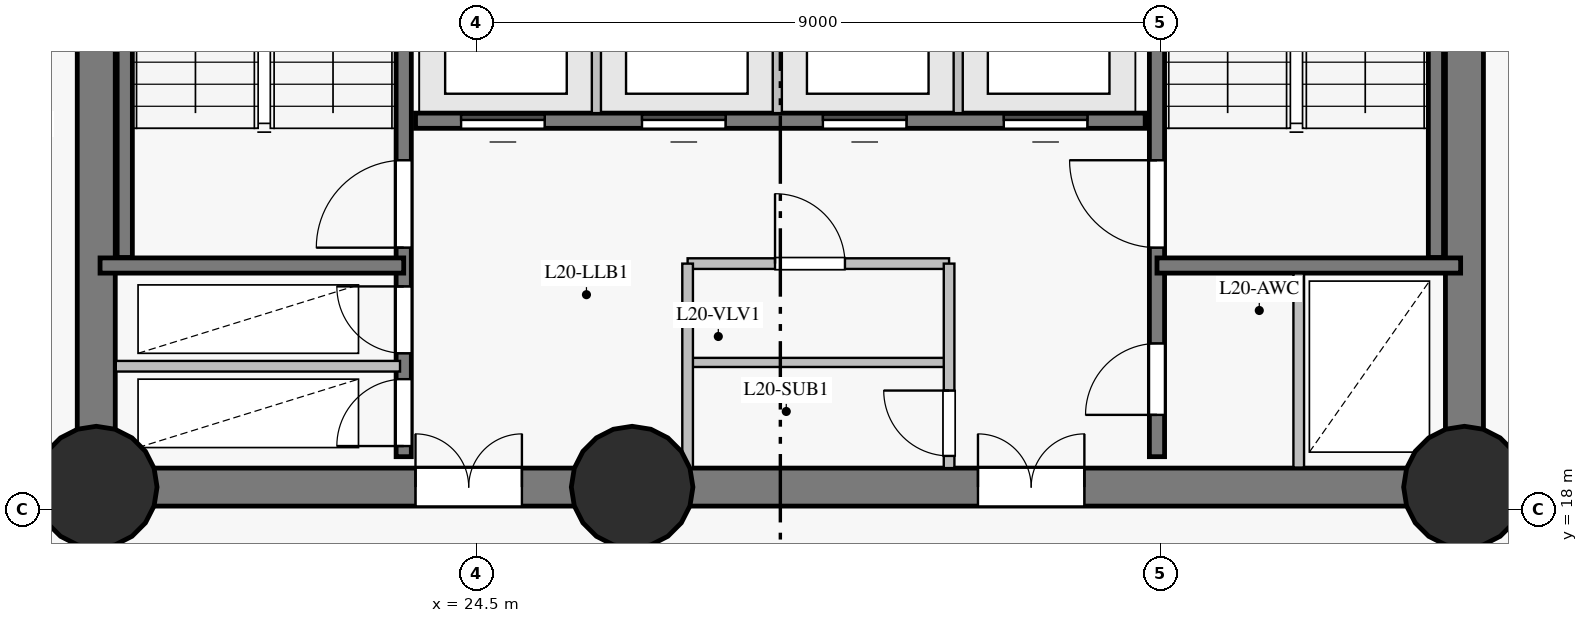
"""IFC4 building model, lengths in metres.
Left out: names, types, materials, properties, quantities, classifications, styles, units other than length and angle.
Written with IfcOpenShell. Run it as: python <this file> out.ifc"""

import sys

from ifc_helpers import new_model, si_unit, direction, frame, frame_2d, origin, origin_with_axes, origin_2d, place, context, subcontext, project, spatial, rectangle, circle, extrude, source, transform, mapped, element, fill, save


model = new_model("IFC4")
c1 = context("Model", 3, precision=1e-05, world=origin(), true_north=direction((0.0, 1.0)))
c2 = subcontext(c1, "Body", "Model", "MODEL_VIEW")
j1 = project(units=[si_unit("LENGTHUNIT", "METRE"), si_unit("PLANEANGLEUNIT", "RADIAN")], contexts=[c1])
p1 = place(None, origin())
s1 = spatial("IfcSite", under=j1, at=p1, CompositionType="ELEMENT")
p2 = place(p1, origin())
s2 = spatial("IfcBuilding", under=s1, at=p2, CompositionType="ELEMENT")
p3 = place(p2, frame((0.0, 0.0, 76.9)))
s3 = spatial("IfcBuildingStorey", under=s2, at=p3, CompositionType="ELEMENT", Elevation=76.9)
p4 = place(p3, frame((19.5, 18.3, 0.0), z_axis=(0.0, 0.0, 1.0), x_axis=(1.0, 0.0, 0.0)))
e1 = element("IfcWall", 1, at=p4, inside=s3, PredefinedType="SHEAR", context=c2, shape_type="SweptSolid", body=[
    extrude(rectangle(XDim=7.05, YDim=0.5, at=frame_2d((3.525, 0.0))), origin(), (0.0, 0.0, 1.0), 3.35),
])
p5 = place(p4, frame((4.2, 0.0, 0.0)))
e2 = element("IfcOpeningElement", 2, at=p5, cuts=e1, PredefinedType="OPENING", context=c2, shape_type="SweptSolid", body=[
    extrude(rectangle(XDim=1.4, YDim=2.2, at=frame_2d((0.7, 1.1))), frame((0.0, 0.26, 0.0), z_axis=(0.0, -1.0, 0.0), x_axis=(1.0, 0.0, 0.0)), (0.0, 0.0, 1.0), 0.52),
])
p6 = place(p3, frame((26.55, 18.3, 0.0), z_axis=(0.0, 0.0, 1.0), x_axis=(1.0, 0.0, 0.0)))
e3 = element("IfcWall", 3, at=p6, inside=s3, PredefinedType="SHEAR", context=c2, shape_type="SweptSolid", body=[
    extrude(rectangle(XDim=10.95, YDim=0.5, at=frame_2d((5.475, 0.0))), origin(), (0.0, 0.0, 1.0), 3.35),
])
p7 = place(p6, frame((4.55, 0.0, 0.0)))
e4 = element("IfcOpeningElement", 4, at=p7, cuts=e3, PredefinedType="OPENING", context=c2, shape_type="SweptSolid", body=[
    extrude(rectangle(XDim=1.4, YDim=2.2, at=frame_2d((0.7, 1.1))), frame((0.0, 0.26, 0.0), z_axis=(0.0, -1.0, 0.0), x_axis=(1.0, 0.0, 0.0)), (0.0, 0.0, 1.0), 0.52),
])
p8 = place(p3, frame((37.5, 18.3, 0.0), z_axis=(0.0, 0.0, 1.0), x_axis=(0.0, 1.0, 0.0)))
e5 = element("IfcWall", 5, at=p8, inside=s3, PredefinedType="SHEAR", context=c2, shape_type="SweptSolid", body=[
    extrude(rectangle(XDim=16.4, YDim=0.5, at=frame_2d((8.2, 0.0))), origin(), (0.0, 0.0, 1.0), 3.35),
])
p9 = place(p8, frame((14.06, 0.0, 0.0)))
e6 = element("IfcOpeningElement", 6, at=p9, cuts=e5, PredefinedType="OPENING", context=c2, shape_type="SweptSolid", body=[
    extrude(rectangle(XDim=1.2, YDim=2.15, at=frame_2d((0.6, 1.075))), frame((0.0, 0.26, 0.0), z_axis=(0.0, -1.0, 0.0), x_axis=(1.0, 0.0, 0.0)), (0.0, 0.0, 1.0), 0.52),
])
p10 = place(p3, frame((19.5, 34.7, 0.0), z_axis=(0.0, 0.0, 1.0), x_axis=(0.0, -1.0, 0.0)))
e7 = element("IfcWall", 7, at=p10, inside=s3, PredefinedType="SHEAR", context=c2, shape_type="SweptSolid", body=[
    extrude(rectangle(XDim=16.4, YDim=0.5, at=frame_2d((8.2, 0.0))), origin(), (0.0, 0.0, 1.0), 3.35),
])
p11 = place(p10, frame((3.1, 0.0, 0.0)))
e8 = element("IfcOpeningElement", 8, at=p11, cuts=e7, PredefinedType="OPENING", context=c2, shape_type="SweptSolid", body=[
    extrude(rectangle(XDim=1.1, YDim=2.15, at=frame_2d((0.55, 1.075))), frame((0.0, 0.26, 0.0), z_axis=(0.0, -1.0, 0.0), x_axis=(1.0, 0.0, 0.0)), (0.0, 0.0, 1.0), 0.52),
])
m1 = source(origin_with_axes(), c2, "Body", "SweptSolid", [
    extrude(circle(Radius=0.8, at=origin_2d()), origin(), (0.0, 0.0, 1.0), 3.6),
])
for number, where, z_axis, x_axis in (
    (9, (19.5, 18.3, 0.0), (0.0, 0.0, 1.0), (1.0, 0.0, 0.0)),
    (10, (26.55, 18.3, 0.0), (0.0, 0.0, 1.0), (1.0, 0.0, 0.0)),
    (11, (37.5, 18.3, 0.0), (0.0, 0.0, 1.0), (1.0, 0.0, 0.0)),
):
    element("IfcColumn", number, at=place(p3, frame(where, z_axis=z_axis, x_axis=x_axis)), inside=s3, PredefinedType="COLUMN", context=c2, shape_type="MappedRepresentation", body=[
        mapped(m1, transform((0.0, 0.0, 0.0), scale=1.0)),
    ])
p12 = place(p3, frame((37.825, 10.417, 0.0), z_axis=(0.0, 0.0, 1.0), x_axis=(0.688609262867, 0.725132596905, 0.0)))
e12 = element("IfcWall", 12, at=p12, inside=s3, PredefinedType="SOLIDWALL", context=c2, shape_type="SweptSolid", body=[
    extrude(rectangle(XDim=10.481, YDim=0.32, at=frame_2d((5.241, 0.0))), origin(), (0.0, 0.0, 1.0), 3.35),
])
p13 = place(p12, frame((1.552, 0.0, 0.85)))
e13 = element("IfcOpeningElement", 13, at=p13, cuts=e12, PredefinedType="OPENING", context=c2, shape_type="SweptSolid", body=[
    extrude(rectangle(XDim=2.1, YDim=1.95, at=frame_2d((1.05, 0.975))), frame((0.0, 0.17, 0.0), z_axis=(0.0, -1.0, 0.0), x_axis=(1.0, 0.0, 0.0)), (0.0, 0.0, 1.0), 0.34),
])
p14 = place(p12, frame((7.513, 0.0, 0.85)))
e14 = element("IfcOpeningElement", 14, at=p14, cuts=e12, PredefinedType="OPENING", context=c2, shape_type="SweptSolid", body=[
    extrude(rectangle(XDim=2.1, YDim=1.95, at=frame_2d((1.05, 0.975))), frame((0.0, 0.17, 0.0), z_axis=(0.0, -1.0, 0.0), x_axis=(1.0, 0.0, 0.0)), (0.0, 0.0, 1.0), 0.34),
])
p15 = place(p3, frame((23.545, 18.7, 0.0), z_axis=(0.0, 0.0, 1.0), x_axis=(0.0, 1.0, 0.0)))
e15 = element("IfcWall", 15, at=p15, inside=s3, PredefinedType="SHEAR", context=c2, shape_type="SweptSolid", body=[
    extrude(rectangle(XDim=15.6, YDim=0.2, at=frame_2d((7.8, 0.0))), origin(), (0.0, 0.0, 1.0), 3.35),
])
p16 = place(p15, frame((2.75, 0.0, 0.0)))
e16 = element("IfcOpeningElement", 16, at=p16, cuts=e15, PredefinedType="OPENING", context=c2, shape_type="SweptSolid", body=[
    extrude(rectangle(XDim=1.15, YDim=2.15, at=frame_2d((0.575, 1.075))), frame((0.0, 0.11, 0.0), z_axis=(0.0, -1.0, 0.0), x_axis=(1.0, 0.0, 0.0)), (0.0, 0.0, 1.0), 0.22),
])
p17 = place(p15, frame((0.14, 0.0, 0.0)))
e17 = element("IfcOpeningElement", 17, at=p17, cuts=e15, PredefinedType="OPENING", context=c2, shape_type="SweptSolid", body=[
    extrude(rectangle(XDim=0.88, YDim=2.1, at=frame_2d((0.44, 1.05))), frame((0.0, 0.11, 0.0), z_axis=(0.0, -1.0, 0.0), x_axis=(1.0, 0.0, 0.0)), (0.0, 0.0, 1.0), 0.22),
])
p18 = place(p15, frame((1.36, 0.0, 0.0)))
e18 = element("IfcOpeningElement", 18, at=p18, cuts=e15, PredefinedType="OPENING", context=c2, shape_type="SweptSolid", body=[
    extrude(rectangle(XDim=0.88, YDim=2.1, at=frame_2d((0.44, 1.05))), frame((0.0, 0.11, 0.0), z_axis=(0.0, -1.0, 0.0), x_axis=(1.0, 0.0, 0.0)), (0.0, 0.0, 1.0), 0.22),
])
p19 = place(p15, frame((12.1, 0.0, 0.0)))
e19 = element("IfcOpeningElement", 19, at=p19, cuts=e15, PredefinedType="OPENING", context=c2, shape_type="SweptSolid", body=[
    extrude(rectangle(XDim=1.12, YDim=2.15, at=frame_2d((0.56, 1.075))), frame((0.0, 0.11, 0.0), z_axis=(0.0, -1.0, 0.0), x_axis=(1.0, 0.0, 0.0)), (0.0, 0.0, 1.0), 0.22),
])
p20 = place(p15, frame((14.05, 0.0, 0.0)))
e20 = element("IfcOpeningElement", 20, at=p20, cuts=e15, PredefinedType="OPENING", context=c2, shape_type="SweptSolid", body=[
    extrude(rectangle(XDim=1.12, YDim=2.15, at=frame_2d((0.56, 1.075))), frame((0.0, 0.11, 0.0), z_axis=(0.0, -1.0, 0.0), x_axis=(1.0, 0.0, 0.0)), (0.0, 0.0, 1.0), 0.22),
])
p21 = place(p3, frame((33.455, 18.7, 0.0), z_axis=(0.0, 0.0, 1.0), x_axis=(0.0, 1.0, 0.0)))
e21 = element("IfcWall", 21, at=p21, inside=s3, PredefinedType="SHEAR", context=c2, shape_type="SweptSolid", body=[
    extrude(rectangle(XDim=15.6, YDim=0.2, at=frame_2d((7.8, 0.0))), origin(), (0.0, 0.0, 1.0), 3.35),
])
p22 = place(p21, frame((2.75, 0.0, 0.0)))
e22 = element("IfcOpeningElement", 22, at=p22, cuts=e21, PredefinedType="OPENING", context=c2, shape_type="SweptSolid", body=[
    extrude(rectangle(XDim=1.15, YDim=2.15, at=frame_2d((0.575, 1.075))), frame((0.0, 0.11, 0.0), z_axis=(0.0, -1.0, 0.0), x_axis=(1.0, 0.0, 0.0)), (0.0, 0.0, 1.0), 0.22),
])
p23 = place(p21, frame((0.55, 0.0, 0.0)))
e23 = element("IfcOpeningElement", 23, at=p23, cuts=e21, PredefinedType="OPENING", context=c2, shape_type="SweptSolid", body=[
    extrude(rectangle(XDim=0.94, YDim=2.1, at=frame_2d((0.47, 1.05))), frame((0.0, 0.11, 0.0), z_axis=(0.0, -1.0, 0.0), x_axis=(1.0, 0.0, 0.0)), (0.0, 0.0, 1.0), 0.22),
])
p24 = place(p3, frame((23.7, 23.12, 0.0), z_axis=(0.0, 0.0, 1.0), x_axis=(1.0, 0.0, 0.0)))
e24 = element("IfcWall", 24, at=p24, inside=s3, PredefinedType="SHEAR", context=c2, shape_type="SweptSolid", body=[
    extrude(rectangle(XDim=9.6, YDim=0.2, at=frame_2d((4.8, 0.0))), origin(), (0.0, 0.0, 1.0), 3.35),
])
p25 = place(p24, frame((0.6, 0.0, 0.0)))
e25 = element("IfcOpeningElement", 25, at=p25, cuts=e24, PredefinedType="OPENING", context=c2, shape_type="SweptSolid", body=[
    extrude(rectangle(XDim=1.1, YDim=2.15, at=frame_2d((0.55, 1.075))), frame((0.0, 0.11, 0.0), z_axis=(0.0, -1.0, 0.0), x_axis=(1.0, 0.0, 0.0)), (0.0, 0.0, 1.0), 0.22),
])
p26 = place(p24, frame((2.98, 0.0, 0.0)))
e26 = element("IfcOpeningElement", 26, at=p26, cuts=e24, PredefinedType="OPENING", context=c2, shape_type="SweptSolid", body=[
    extrude(rectangle(XDim=1.1, YDim=2.15, at=frame_2d((0.55, 1.075))), frame((0.0, 0.11, 0.0), z_axis=(0.0, -1.0, 0.0), x_axis=(1.0, 0.0, 0.0)), (0.0, 0.0, 1.0), 0.22),
])
p27 = place(p24, frame((5.36, 0.0, 0.0)))
e27 = element("IfcOpeningElement", 27, at=p27, cuts=e24, PredefinedType="OPENING", context=c2, shape_type="SweptSolid", body=[
    extrude(rectangle(XDim=1.1, YDim=2.15, at=frame_2d((0.55, 1.075))), frame((0.0, 0.11, 0.0), z_axis=(0.0, -1.0, 0.0), x_axis=(1.0, 0.0, 0.0)), (0.0, 0.0, 1.0), 0.22),
])
p28 = place(p24, frame((7.74, 0.0, 0.0)))
e28 = element("IfcOpeningElement", 28, at=p28, cuts=e24, PredefinedType="OPENING", context=c2, shape_type="SweptSolid", body=[
    extrude(rectangle(XDim=1.1, YDim=2.15, at=frame_2d((0.55, 1.075))), frame((0.0, 0.11, 0.0), z_axis=(0.0, -1.0, 0.0), x_axis=(1.0, 0.0, 0.0)), (0.0, 0.0, 1.0), 0.22),
])
for number, where, z_axis, x_axis in (
    (29, (19.875, 21.32, 0.0), (0.0, 0.0, 1.0), (0.0, 1.0, 0.0)),
    (30, (37.125, 21.32, 0.0), (0.0, 0.0, 1.0), (0.0, 1.0, 0.0)),
):
    element("IfcWall", number, at=place(p3, frame(where, z_axis=z_axis, x_axis=x_axis)), inside=s3, PredefinedType="SHEAR", context=c2, shape_type="SweptSolid", body=[
        extrude(rectangle(XDim=7.5, YDim=0.2, at=frame_2d((3.75, 0.0))), origin(), (0.0, 0.0, 1.0), 3.35),
    ])
for number, where, z_axis, x_axis in (
    (31, (33.455, 21.215, 0.0), (0.0, 0.0, 1.0), (1.0, 0.0, 0.0)),
    (32, (19.55, 21.215, 0.0), (0.0, 0.0, 1.0), (1.0, 0.0, 0.0)),
):
    element("IfcWall", number, at=place(p3, frame(where, z_axis=z_axis, x_axis=x_axis)), inside=s3, PredefinedType="SHEAR", context=c2, shape_type="SweptSolid", body=[
        extrude(rectangle(XDim=3.995, YDim=0.2, at=frame_2d((1.998, 0.0))), origin(), (0.0, 0.0, 1.0), 3.35),
    ])
p29 = place(p3, frame((19.757, 19.89, 0.0), z_axis=(0.0, 0.0, 1.0), x_axis=(1.0, 0.0, 0.0)))
e33 = element("IfcWall", 33, at=p29, inside=s3, PredefinedType="PARTITIONING", context=c2, shape_type="SweptSolid", body=[
    extrude(rectangle(XDim=3.739, YDim=0.14, at=frame_2d((1.87, 0.0))), origin(), (0.0, 0.0, 1.0), 3.35),
])
p30 = place(p3, frame((27.28, 21.24, 0.0), z_axis=(0.0, 0.0, 1.0), x_axis=(1.0, 0.0, 0.0)))
e34 = element("IfcWall", 34, at=p30, inside=s3, PredefinedType="PARTITIONING", context=c2, shape_type="SweptSolid", body=[
    extrude(rectangle(XDim=3.44, YDim=0.14, at=frame_2d((1.72, 0.0))), origin(), (0.0, 0.0, 1.0), 3.35),
])
p31 = place(p30, frame((1.15, 0.0, 0.0)))
e35 = element("IfcOpeningElement", 35, at=p31, cuts=e34, PredefinedType="OPENING", context=c2, shape_type="SweptSolid", body=[
    extrude(rectangle(XDim=0.92, YDim=2.1, at=frame_2d((0.46, 1.05))), frame((0.0, 0.08, 0.0), z_axis=(0.0, -1.0, 0.0), x_axis=(1.0, 0.0, 0.0)), (0.0, 0.0, 1.0), 0.16),
])
p32 = place(p3, frame((27.28, 19.94, 0.0), z_axis=(0.0, 0.0, 1.0), x_axis=(1.0, 0.0, 0.0)))
e36 = element("IfcWall", 36, at=p32, inside=s3, PredefinedType="PARTITIONING", context=c2, shape_type="SweptSolid", body=[
    extrude(rectangle(XDim=3.44, YDim=0.12, at=frame_2d((1.72, 0.0))), origin(), (0.0, 0.0, 1.0), 3.35),
])
p33 = place(p3, frame((27.28, 18.55, 0.0), z_axis=(0.0, 0.0, 1.0), x_axis=(0.0, 1.0, 0.0)))
e37 = element("IfcWall", 37, at=p33, inside=s3, PredefinedType="PARTITIONING", context=c2, shape_type="SweptSolid", body=[
    extrude(rectangle(XDim=2.69, YDim=0.14, at=frame_2d((1.345, 0.0))), origin(), (0.0, 0.0, 1.0), 3.35),
])
p34 = place(p3, frame((30.72, 18.55, 0.0), z_axis=(0.0, 0.0, 1.0), x_axis=(0.0, 1.0, 0.0)))
e38 = element("IfcWall", 38, at=p34, inside=s3, PredefinedType="PARTITIONING", context=c2, shape_type="SweptSolid", body=[
    extrude(rectangle(XDim=2.69, YDim=0.14, at=frame_2d((1.345, 0.0))), origin(), (0.0, 0.0, 1.0), 3.35),
])
p35 = place(p34, frame((0.16, 0.0, 0.0)))
e39 = element("IfcOpeningElement", 39, at=p35, cuts=e38, PredefinedType="OPENING", context=c2, shape_type="SweptSolid", body=[
    extrude(rectangle(XDim=0.86, YDim=2.1, at=frame_2d((0.43, 1.05))), frame((0.0, 0.08, 0.0), z_axis=(0.0, -1.0, 0.0), x_axis=(1.0, 0.0, 0.0)), (0.0, 0.0, 1.0), 0.16),
])
for number, where, z_axis, x_axis in (
    (40, (26.08, 23.22, 0.0), (0.0, 0.0, 1.0), (0.0, 1.0, 0.0)),
    (41, (28.46, 23.22, 0.0), (0.0, 0.0, 1.0), (0.0, 1.0, 0.0)),
    (42, (30.84, 23.22, 0.0), (0.0, 0.0, 1.0), (0.0, 1.0, 0.0)),
):
    element("IfcWall", number, at=place(p3, frame(where, z_axis=z_axis, x_axis=x_axis)), inside=s3, PredefinedType="PARTITIONING", context=c2, shape_type="SweptSolid", body=[
        extrude(rectangle(XDim=2.6, YDim=0.12, at=frame_2d((1.3, 0.0))), origin(), (0.0, 0.0, 1.0), 3.35),
    ])
p36 = place(p3, frame((35.32, 18.557, 0.0), z_axis=(0.0, 0.0, 1.0), x_axis=(0.0, 1.0, 0.0)))
e43 = element("IfcWall", 43, at=p36, inside=s3, PredefinedType="PARTITIONING", context=c2, shape_type="SweptSolid", body=[
    extrude(rectangle(XDim=2.553, YDim=0.14, at=frame_2d((1.277, 0.0))), origin(), (0.0, 0.0, 1.0), 3.35),
])
m2 = source(origin_with_axes(), c2, "Body", "SweptSolid", [
    extrude(rectangle(XDim=1.15, YDim=2.15, at=frame_2d((0.575, 1.075))), frame((0.0, 0.025, 0.0), z_axis=(0.0, -1.0, 0.0), x_axis=(1.0, 0.0, 0.0)), (0.0, 0.0, 1.0), 0.05),
])
p37 = place(p16, origin())
e44 = element("IfcDoor", 44, at=p37, inside=s3, OperationType="SINGLE_SWING_LEFT", PredefinedType="DOOR", context=c2, shape_type="MappedRepresentation", body=[
    mapped(m2, transform((0.0, 0.0, 0.0), scale=1.0)),
])
fill(e16, e44)
p38 = place(p22, origin())
e45 = element("IfcDoor", 45, at=p38, inside=s3, OperationType="SINGLE_SWING_RIGHT", PredefinedType="DOOR", context=c2, shape_type="MappedRepresentation", body=[
    mapped(m2, transform((0.0, 0.0, 0.0), scale=1.0)),
])
fill(e22, e45)
m3 = source(origin_with_axes(), c2, "Body", "SweptSolid", [
    extrude(rectangle(XDim=0.88, YDim=2.1, at=frame_2d((0.44, 1.05))), frame((0.0, 0.025, 0.0), z_axis=(0.0, -1.0, 0.0), x_axis=(1.0, 0.0, 0.0)), (0.0, 0.0, 1.0), 0.05),
])
p39 = place(p17, origin())
e46 = element("IfcDoor", 46, at=p39, inside=s3, OperationType="SINGLE_SWING_LEFT", PredefinedType="DOOR", context=c2, shape_type="MappedRepresentation", body=[
    mapped(m3, transform((0.0, 0.0, 0.0), scale=1.0)),
])
fill(e17, e46)
p40 = place(p18, origin())
e47 = element("IfcDoor", 47, at=p40, inside=s3, OperationType="SINGLE_SWING_RIGHT", PredefinedType="DOOR", context=c2, shape_type="MappedRepresentation", body=[
    mapped(m3, transform((0.0, 0.0, 0.0), scale=1.0)),
])
fill(e18, e47)
m4 = source(origin_with_axes(), c2, "Body", "SweptSolid", [
    extrude(rectangle(XDim=1.4, YDim=2.2, at=frame_2d((0.7, 1.1))), frame((0.0, 0.025, 0.0), z_axis=(0.0, -1.0, 0.0), x_axis=(1.0, 0.0, 0.0)), (0.0, 0.0, 1.0), 0.05),
])
p41 = place(p5, origin())
e48 = element("IfcDoor", 48, at=p41, inside=s3, OperationType="DOUBLE_DOOR_SINGLE_SWING", PredefinedType="DOOR", context=c2, shape_type="MappedRepresentation", body=[
    mapped(m4, transform((0.0, 0.0, 0.0), scale=1.0)),
])
fill(e2, e48)
p42 = place(p7, origin())
e49 = element("IfcDoor", 49, at=p42, inside=s3, OperationType="DOUBLE_DOOR_SINGLE_SWING", PredefinedType="DOOR", context=c2, shape_type="MappedRepresentation", body=[
    mapped(m4, transform((0.0, 0.0, 0.0), scale=1.0)),
])
fill(e4, e49)
m5 = source(origin_with_axes(), c2, "Body", "SweptSolid", [
    extrude(rectangle(XDim=0.94, YDim=2.1, at=frame_2d((0.47, 1.05))), frame((0.0, 0.025, 0.0), z_axis=(0.0, -1.0, 0.0), x_axis=(1.0, 0.0, 0.0)), (0.0, 0.0, 1.0), 0.05),
])
p43 = place(p23, origin())
e50 = element("IfcDoor", 50, at=p43, inside=s3, OperationType="SINGLE_SWING_LEFT", PredefinedType="DOOR", context=c2, shape_type="MappedRepresentation", body=[
    mapped(m5, transform((0.0, 0.0, 0.0), scale=1.0)),
])
fill(e23, e50)
m6 = source(origin_with_axes(), c2, "Body", "SweptSolid", [
    extrude(rectangle(XDim=0.86, YDim=2.1, at=frame_2d((0.43, 1.05))), frame((0.0, 0.025, 0.0), z_axis=(0.0, -1.0, 0.0), x_axis=(1.0, 0.0, 0.0)), (0.0, 0.0, 1.0), 0.05),
])
p44 = place(p35, origin())
e51 = element("IfcDoor", 51, at=p44, inside=s3, OperationType="SINGLE_SWING_RIGHT", PredefinedType="DOOR", context=c2, shape_type="MappedRepresentation", body=[
    mapped(m6, transform((0.0, 0.0, 0.0), scale=1.0)),
])
fill(e39, e51)
m7 = source(origin_with_axes(), c2, "Body", "SweptSolid", [
    extrude(rectangle(XDim=0.92, YDim=2.1, at=frame_2d((0.46, 1.05))), frame((0.0, 0.025, 0.0), z_axis=(0.0, -1.0, 0.0), x_axis=(1.0, 0.0, 0.0)), (0.0, 0.0, 1.0), 0.05),
])
p45 = place(p31, origin())
e52 = element("IfcDoor", 52, at=p45, inside=s3, OperationType="SINGLE_SWING_LEFT", PredefinedType="DOOR", context=c2, shape_type="MappedRepresentation", body=[
    mapped(m7, transform((0.0, 0.0, 0.0), scale=1.0)),
])
fill(e35, e52)
m8 = source(origin_with_axes(), c2, "Body", "SweptSolid", [
    extrude(rectangle(XDim=1.1, YDim=2.15, at=frame_2d((0.55, 1.075))), frame((0.0, 0.025, 0.0), z_axis=(0.0, -1.0, 0.0), x_axis=(1.0, 0.0, 0.0)), (0.0, 0.0, 1.0), 0.05),
])
p46 = place(p25, origin())
e53 = element("IfcDoor", 53, at=p46, inside=s3, OperationType="SLIDING_TO_LEFT", PredefinedType="DOOR", context=c2, shape_type="MappedRepresentation", body=[
    mapped(m8, transform((0.0, 0.0, 0.0), scale=1.0)),
])
fill(e25, e53)
p47 = place(p26, origin())
e54 = element("IfcDoor", 54, at=p47, inside=s3, OperationType="SLIDING_TO_RIGHT", PredefinedType="DOOR", context=c2, shape_type="MappedRepresentation", body=[
    mapped(m8, transform((0.0, 0.0, 0.0), scale=1.0)),
])
fill(e26, e54)
p48 = place(p27, origin())
e55 = element("IfcDoor", 55, at=p48, inside=s3, OperationType="SLIDING_TO_LEFT", PredefinedType="DOOR", context=c2, shape_type="MappedRepresentation", body=[
    mapped(m8, transform((0.0, 0.0, 0.0), scale=1.0)),
])
fill(e27, e55)
p49 = place(p28, origin())
e56 = element("IfcDoor", 56, at=p49, inside=s3, OperationType="SLIDING_TO_RIGHT", PredefinedType="DOOR", context=c2, shape_type="MappedRepresentation", body=[
    mapped(m8, transform((0.0, 0.0, 0.0), scale=1.0)),
])
fill(e28, e56)
save(model, sys.argv[1])
